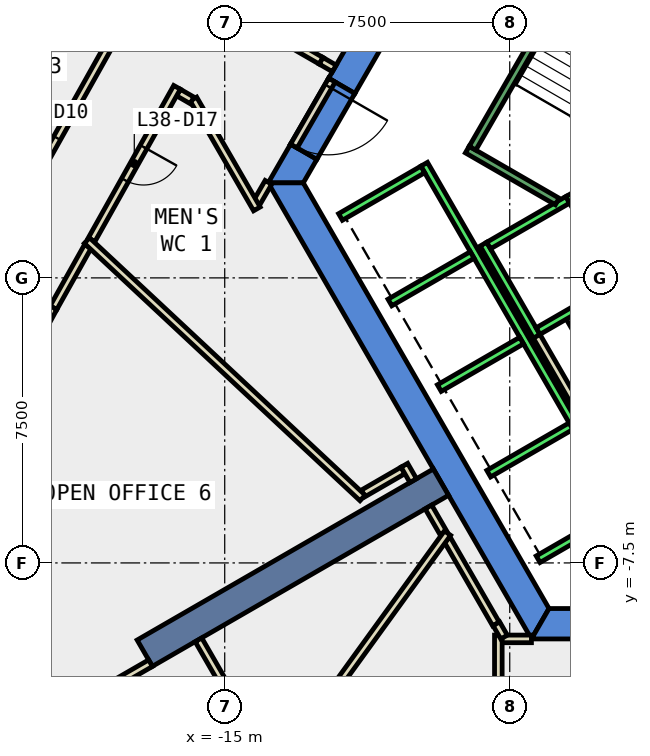
"""IFC4 building model, lengths in metres.
Left out: names, types, materials, properties, quantities, classifications, styles, units other than length and angle.
Written with IfcOpenShell. Run it as: python <this file> out.ifc"""

import sys

from ifc_helpers import new_model, si_unit, direction, frame, frame_2d, origin, place, context, subcontext, project, spatial, polyline, rectangle, outline, extrude, element, fill, save


model = new_model("IFC4")
c1 = context("Model", 3, precision=1e-05, world=origin(), true_north=direction((0.0, 1.0)))
c2 = subcontext(c1, "Body", "Model", "MODEL_VIEW")
j1 = project(units=[si_unit("LENGTHUNIT", "METRE"), si_unit("PLANEANGLEUNIT", "RADIAN")], contexts=[c1])
p1 = place(None, origin())
s1 = spatial("IfcSite", under=j1, at=p1, CompositionType="ELEMENT")
p2 = place(p1, origin())
s2 = spatial("IfcBuilding", under=s1, at=p2, CompositionType="ELEMENT")
p3 = place(p2, frame((0.0, 0.0, 171.8)))
s3 = spatial("IfcBuildingStorey", under=s2, at=p3, CompositionType="ELEMENT", Elevation=171.8)
p4 = place(p3, frame((0.0, 0.0, -0.4)))
e1 = element("IfcWall", 1, at=p4, inside=s3, PredefinedType="SHEAR", context=c2, shape_type="SweptSolid", body=[
    extrude(outline(polyline([(-12.267, 5.252), (-11.575, 4.852), (-6.466, 13.7), (-6.928, 14.5), (-12.267, 5.252)])), origin(), (0.0, 0.0, 1.0), 4.2),
])
p5 = place(p3, frame((0.0, 0.0, -0.4)))
e2 = element("IfcWall", 2, at=p5, inside=s3, PredefinedType="SHEAR", context=c2, shape_type="SweptSolid", body=[
    extrude(outline(polyline([(-12.575, 3.12), (-13.267, 3.52), (-13.856, 2.5), (-12.933, 2.5), (-12.575, 3.12)])), origin(), (0.0, 0.0, 1.0), 4.2),
])
p6 = place(p3, frame((0.0, 0.0, 3.6)))
e3 = element("IfcWall", 3, at=p6, inside=s3, PredefinedType="SHEAR", context=c2, shape_type="SweptSolid", body=[
    extrude(outline(polyline([(-13.267, 3.52), (-12.575, 3.12), (-11.575, 4.852), (-12.267, 5.252), (-13.267, 3.52)])), origin(), (0.0, 0.0, 1.0), 0.2),
])
p7 = place(p3, frame((0.0, 0.0, -0.4)))
e4 = element("IfcWall", 4, at=p7, inside=s3, PredefinedType="SHEAR", context=c2, shape_type="SweptSolid", body=[
    extrude(outline(polyline([(-13.856, 2.5), (-6.928, -9.5), (-6.466, -8.7), (-12.933, 2.5), (-13.856, 2.5)])), origin(), (0.0, 0.0, 1.0), 4.2),
])
p8 = place(p3, frame((0.0, 0.0, -0.4)))
e5 = element("IfcWall", 5, at=p8, inside=s3, PredefinedType="SHEAR", context=c2, shape_type="SweptSolid", body=[
    extrude(outline(polyline([(3.75, -9.5), (3.75, -8.7), (-6.466, -8.7), (-6.928, -9.5), (3.75, -9.5)])), origin(), (0.0, 0.0, 1.0), 4.2),
])
p9 = place(p3, frame((-9.31, -5.375, -0.4), z_axis=(0.0, 0.0, 1.0), x_axis=(-0.866017533419, -0.500013631625, 0.0)))
e6 = element("IfcWall", 6, at=p9, inside=s3, PredefinedType="SHEAR", context=c2, shape_type="SweptSolid", body=[
    extrude(rectangle(XDim=9.0, YDim=0.8, at=frame_2d((4.5, 0.0))), origin(), (0.0, 0.0, 1.0), 4.2),
])
p10 = place(p3, frame((-14.922, 7.131, 0.0), z_axis=(0.0, 0.0, 1.0), x_axis=(0.866124025492, -0.499829143273, 0.0)))
e7 = element("IfcWall", 7, at=p10, inside=s3, PredefinedType="PARTITIONING", context=c2, shape_type="SweptSolid", body=[
    extrude(rectangle(XDim=2.839, YDim=0.2, at=frame_2d((1.42, 0.0))), origin(), (0.0, 0.0, 1.0), 3.8),
])
p11 = place(p3, frame((-13.85, 2.514, 0.0), z_axis=(0.0, 0.0, 1.0), x_axis=(-0.500418219013, -0.865783810244, 0.0)))
e8 = element("IfcWall", 8, at=p11, inside=s3, PredefinedType="PARTITIONING", context=c2, shape_type="SweptSolid", body=[
    extrude(rectangle(XDim=0.607, YDim=0.2, at=frame_2d((0.304, 0.0))), origin(), (0.0, 0.0, 1.0), 3.8),
])
p12 = place(p3, frame((-14.154, 1.815, 0.0), z_axis=(0.0, 0.0, 1.0), x_axis=(-0.500038857296, 0.866002968352, 0.0)))
e9 = element("IfcWall", 9, at=p12, inside=s3, PredefinedType="PARTITIONING", context=c2, shape_type="SweptSolid", body=[
    extrude(rectangle(XDim=3.34, YDim=0.2, at=frame_2d((1.67, 0.0))), origin(), (0.0, 0.0, 1.0), 3.8),
])
p13 = place(p3, frame((-15.86, 4.671, 0.0), z_axis=(0.0, 0.0, 1.0), x_axis=(-0.866047486323, 0.49996174997, 0.0)))
e10 = element("IfcWall", 10, at=p13, inside=s3, PredefinedType="PARTITIONING", context=c2, shape_type="SweptSolid", body=[
    extrude(rectangle(XDim=0.412, YDim=0.2, at=frame_2d((0.206, 0.0))), origin(), (0.0, 0.0, 1.0), 3.8),
])
p14 = place(p3, frame((-16.255, 5.014, 0.0), z_axis=(0.0, 0.0, 1.0), x_axis=(-0.488988017817, -0.87229050117, 0.0)))
e11 = element("IfcWall", 11, at=p14, inside=s3, PredefinedType="PARTITIONING", context=c2, shape_type="SweptSolid", body=[
    extrude(rectangle(XDim=4.599, YDim=0.2, at=frame_2d((2.3, 0.0))), origin(), (0.0, 0.0, 1.0), 3.8),
])
p15 = place(p14, frame((1.8, 0.0, 0.0)))
e12 = element("IfcOpeningElement", 12, at=p15, cuts=e11, PredefinedType="OPENING", context=c2, shape_type="SweptSolid", body=[
    extrude(rectangle(XDim=1.0, YDim=2.1, at=frame_2d((0.5, 1.05))), frame((0.0, 0.11, 0.0), z_axis=(0.0, -1.0, 0.0), x_axis=(1.0, 0.0, 0.0)), (0.0, 0.0, 1.0), 0.22),
])
p16 = place(p3, frame((-18.602, 0.828, 0.0), z_axis=(0.0, 0.0, 1.0), x_axis=(-0.488969229043, -0.872301033502, 0.0)))
e13 = element("IfcWall", 13, at=p16, inside=s3, PredefinedType="PARTITIONING", context=c2, shape_type="SweptSolid", body=[
    extrude(rectangle(XDim=1.849, YDim=0.2, at=frame_2d((0.924, 0.0))), origin(), (0.0, 0.0, 1.0), 3.8),
])
p17 = place(p3, frame((-19.506, -0.785, 0.0), z_axis=(0.0, 0.0, 1.0), x_axis=(-0.477513909405, -0.878624189472, 0.0)))
e14 = element("IfcWall", 14, at=p17, inside=s3, PredefinedType="PARTITIONING", context=c2, shape_type="SweptSolid", body=[
    extrude(rectangle(XDim=6.956, YDim=0.2, at=frame_2d((3.478, 0.0))), origin(), (0.0, 0.0, 1.0), 3.8),
])
p18 = place(p17, frame((2.978, 0.0, 0.0)))
e15 = element("IfcOpeningElement", 15, at=p18, cuts=e14, PredefinedType="OPENING", context=c2, shape_type="SweptSolid", body=[
    extrude(rectangle(XDim=1.0, YDim=2.1, at=frame_2d((0.5, 1.05))), frame((0.0, 0.11, 0.0), z_axis=(0.0, -1.0, 0.0), x_axis=(1.0, 0.0, 0.0)), (0.0, 0.0, 1.0), 0.22),
])
p19 = place(p3, frame((-21.381, 0.165, 0.0), z_axis=(0.0, 0.0, 1.0), x_axis=(0.489014139272, 0.872275857509, 0.0)))
e16 = element("IfcWall", 16, at=p19, inside=s3, PredefinedType="PARTITIONING", context=c2, shape_type="SweptSolid", body=[
    extrude(rectangle(XDim=7.057, YDim=0.2, at=frame_2d((3.529, 0.0))), origin(), (0.0, 0.0, 1.0), 3.8),
])
p20 = place(p19, frame((3.029, 0.0, 0.0)))
e17 = element("IfcOpeningElement", 17, at=p20, cuts=e16, PredefinedType="OPENING", context=c2, shape_type="SweptSolid", body=[
    extrude(rectangle(XDim=1.0, YDim=2.1, at=frame_2d((0.5, 1.05))), frame((0.0, 0.11, 0.0), z_axis=(0.0, -1.0, 0.0), x_axis=(1.0, 0.0, 0.0)), (0.0, 0.0, 1.0), 0.22),
])
p21 = place(p3, frame((-5.126, -2.422, 0.0), z_axis=(0.0, 0.0, 1.0), x_axis=(-0.500062241894, 0.865989465428, 0.0)))
e18 = element("IfcWall", 18, at=p21, inside=s3, PredefinedType="PARTITIONING", context=c2, shape_type="SweptSolid", body=[
    extrude(rectangle(XDim=1.7, YDim=0.2, at=frame_2d((0.85, 0.0))), origin(), (0.0, 0.0, 1.0), 3.8),
])
p22 = place(p3, frame((-5.492, -3.788, 0.0), z_axis=(0.0, 0.0, 1.0), x_axis=(-0.500008949224, 0.866020236886, 0.0)))
e19 = element("IfcWall", 19, at=p22, inside=s3, PredefinedType="PARTITIONING", context=c2, shape_type="SweptSolid", body=[
    extrude(rectangle(XDim=2.68, YDim=0.2, at=frame_2d((1.34, 0.0))), origin(), (0.0, 0.0, 1.0), 3.8),
])
p23 = place(p3, frame((-7.722, -9.499, 0.0), z_axis=(0.0, 0.0, 1.0), x_axis=(1.0, 0.0, 0.0)))
e20 = element("IfcWall", 20, at=p23, inside=s3, PredefinedType="PARTITIONING", context=c2, shape_type="SweptSolid", body=[
    extrude(rectangle(XDim=0.793, YDim=0.2, at=frame_2d((0.396, 0.0))), origin(), (0.0, 0.0, 1.0), 3.8),
])
p24 = place(p3, frame((-7.8, -17.171, 0.0), z_axis=(0.0, 0.0, 1.0), x_axis=(0.0, 1.0, 0.0)))
e21 = element("IfcWall", 21, at=p24, inside=s3, PredefinedType="PARTITIONING", context=c2, shape_type="SweptSolid", body=[
    extrude(rectangle(XDim=7.772, YDim=0.2, at=frame_2d((3.886, 0.0))), origin(), (0.0, 0.0, 1.0), 3.8),
])
p25 = place(p24, frame((3.386, 0.0, 0.0)))
e22 = element("IfcOpeningElement", 22, at=p25, cuts=e21, PredefinedType="OPENING", context=c2, shape_type="SweptSolid", body=[
    extrude(rectangle(XDim=1.0, YDim=2.1, at=frame_2d((0.5, 1.05))), frame((0.0, 0.11, 0.0), z_axis=(0.0, -1.0, 0.0), x_axis=(1.0, 0.0, 0.0)), (0.0, 0.0, 1.0), 0.22),
])
p26 = place(p3, frame((-7.862, -9.107, 0.0), z_axis=(0.0, 0.0, 1.0), x_axis=(-0.499994038704, 0.866028845513, 0.0)))
e23 = element("IfcWall", 23, at=p26, inside=s3, PredefinedType="PARTITIONING", context=c2, shape_type="SweptSolid", body=[
    extrude(rectangle(XDim=2.568, YDim=0.2, at=frame_2d((1.284, 0.0))), origin(), (0.0, 0.0, 1.0), 3.8),
])
p27 = place(p3, frame((-7.65, -9.451, 0.0), z_axis=(0.0, 0.0, 1.0), x_axis=(-0.500297731093, 0.865853440406, 0.0)))
e24 = element("IfcWall", 24, at=p27, inside=s3, PredefinedType="PARTITIONING", context=c2, shape_type="SweptSolid", body=[
    extrude(rectangle(XDim=0.404, YDim=0.2, at=frame_2d((0.202, 0.0))), origin(), (0.0, 0.0, 1.0), 3.8),
])
p28 = place(p3, frame((-9.246, -6.71, 0.0), z_axis=(0.0, 0.0, 1.0), x_axis=(-0.499570510076, 0.86627322795, 0.0)))
e25 = element("IfcWall", 25, at=p28, inside=s3, PredefinedType="PARTITIONING", context=c2, shape_type="SweptSolid", body=[
    extrude(rectangle(XDim=0.788, YDim=0.2, at=frame_2d((0.394, 0.0))), origin(), (0.0, 0.0, 1.0), 3.8),
])
p29 = place(p3, frame((-10.31, -5.066, 0.0), z_axis=(0.0, 0.0, 1.0), x_axis=(-0.865587329375, -0.500758000661, 0.0)))
e26 = element("IfcWall", 26, at=p29, inside=s3, PredefinedType="PARTITIONING", context=c2, shape_type="SweptSolid", body=[
    extrude(rectangle(XDim=1.21, YDim=0.2, at=frame_2d((0.605, 0.0))), origin(), (0.0, 0.0, 1.0), 3.8),
])
p30 = place(p3, frame((-11.372, -5.79, 0.0), z_axis=(0.0, 0.0, 1.0), x_axis=(-0.730922728623, 0.682460229451, 0.0)))
e27 = element("IfcWall", 27, at=p30, inside=s3, PredefinedType="PARTITIONING", context=c2, shape_type="SweptSolid", body=[
    extrude(rectangle(XDim=9.924, YDim=0.2, at=frame_2d((4.962, 0.0))), origin(), (0.0, 0.0, 1.0), 3.8),
])
p31 = place(p3, frame((-13.744, -13.076, 0.0), z_axis=(0.0, 0.0, 1.0), x_axis=(0.586577314901, 0.809893235953, 0.0)))
e28 = element("IfcWall", 28, at=p31, inside=s3, PredefinedType="PARTITIONING", context=c2, shape_type="SweptSolid", body=[
    extrude(rectangle(XDim=7.854, YDim=0.2, at=frame_2d((3.927, 0.0))), origin(), (0.0, 0.0, 1.0), 3.8),
])
p32 = place(p3, frame((-13.736, -12.909, 0.0), z_axis=(0.0, 0.0, 1.0), x_axis=(-0.49990810406, 0.866078453429, 0.0)))
e29 = element("IfcWall", 29, at=p32, inside=s3, PredefinedType="PARTITIONING", context=c2, shape_type="SweptSolid", body=[
    extrude(rectangle(XDim=3.908, YDim=0.2, at=frame_2d((1.954, 0.0))), origin(), (0.0, 0.0, 1.0), 3.8),
])
p33 = place(p3, frame((-16.952, -10.138, 0.0), z_axis=(0.0, 0.0, 1.0), x_axis=(-0.866054992606, -0.499948747156, 0.0)))
e30 = element("IfcWall", 30, at=p33, inside=s3, PredefinedType="PARTITIONING", context=c2, shape_type="SweptSolid", body=[
    extrude(rectangle(XDim=4.701, YDim=0.2, at=frame_2d((2.35, 0.0))), origin(), (0.0, 0.0, 1.0), 3.8),
])
p34 = place(p3, frame((-12.18, 5.202, 0.0), z_axis=(0.0, 0.0, 1.0), x_axis=(-0.50002537861, -0.866010750942, 0.0)))
e31 = element("IfcWall", 31, at=p34, inside=s3, PredefinedType="PARTITIONING", context=c2, shape_type="SweptSolid", body=[
    extrude(rectangle(XDim=2.0, YDim=0.2, at=frame_2d((1.0, 0.0))), origin(), (0.0, 0.0, 1.0), 2.4),
])
p35 = place(p34, frame((0.19, 0.0, 0.0)))
e32 = element("IfcOpeningElement", 32, at=p35, cuts=e31, PredefinedType="OPENING", context=c2, shape_type="SweptSolid", body=[
    extrude(rectangle(XDim=1.8, YDim=2.1, at=frame_2d((0.9, 1.05))), frame((0.0, 0.11, 0.0), z_axis=(0.0, -1.0, 0.0), x_axis=(1.0, 0.0, 0.0)), (0.0, 0.0, 1.0), 0.22),
])
p36 = place(p3, frame((-10.04, -5.334, 0.0), z_axis=(0.0, 0.0, 1.0), x_axis=(-0.499405191234, 0.86636854454, 0.0)))
e33 = element("IfcWall", 33, at=p36, inside=s3, PredefinedType="PARTITIONING", context=c2, shape_type="SweptSolid", body=[
    extrude(rectangle(XDim=0.466, YDim=0.2, at=frame_2d((0.233, 0.0))), origin(), (0.0, 0.0, 1.0), 3.8),
])
p37 = place(p3, frame((-12.463, 5.712, 0.0), z_axis=(0.0, 0.0, 1.0), x_axis=(0.865788603161, -0.500409926597, 0.0)))
e34 = element("IfcWall", 34, at=p37, inside=s3, PredefinedType="PARTITIONING", context=c2, shape_type="SweptSolid", body=[
    extrude(rectangle(XDim=0.4, YDim=0.2, at=frame_2d((0.2, 0.0))), origin(), (0.0, 0.0, 1.0), 2.4),
])
p38 = place(p3, frame((-5.94, 2.188, 0.0), z_axis=(0.0, 0.0, 1.0), x_axis=(0.49994636267, -0.866056369097, 0.0)))
e35 = element("IfcWall", 35, at=p38, inside=s3, PredefinedType="STANDARD", context=c2, shape_type="SweptSolid", body=[
    extrude(rectangle(XDim=2.8, YDim=0.2, at=frame_2d((1.4, 0.0))), origin(), (0.0, 0.0, 1.0), 3.8),
])
p39 = place(p38, frame((1.225, 0.0, 0.0)))
e36 = element("IfcOpeningElement", 36, at=p39, cuts=e35, PredefinedType="OPENING", context=c2, shape_type="SweptSolid", body=[
    extrude(rectangle(XDim=1.1, YDim=2.1, at=frame_2d((0.55, 1.05))), frame((0.0, 0.11, 0.0), z_axis=(0.0, -1.0, 0.0), x_axis=(1.0, 0.0, 0.0)), (0.0, 0.0, 1.0), 0.22),
])
p40 = place(p3, frame((-8.192, 0.888, 0.0), z_axis=(0.0, 0.0, 1.0), x_axis=(0.49994636267, -0.866056369097, 0.0)))
e37 = element("IfcWall", 37, at=p40, inside=s3, PredefinedType="STANDARD", context=c2, shape_type="SweptSolid", body=[
    extrude(rectangle(XDim=2.8, YDim=0.2, at=frame_2d((1.4, 0.0))), origin(), (0.0, 0.0, 1.0), 3.8),
])
for number, where, z_axis, x_axis in (
    (38, (-5.977, 2.052, 0.0), (0.0, 0.0, 1.0), (-0.866, -0.5, 0.0)),
    (39, (-4.677, -0.2, 0.0), (0.0, 0.0, 1.0), (-0.866, -0.5, 0.0)),
):
    element("IfcWall", number, at=place(p3, frame(where, z_axis=z_axis, x_axis=x_axis)), inside=s3, PredefinedType="STANDARD", context=c2, shape_type="SweptSolid", body=[
        extrude(rectangle(XDim=2.399, YDim=0.2, at=frame_2d((1.2, 0.0))), origin(), (0.0, 0.0, 1.0), 3.8),
    ])
p41 = place(p3, frame((-9.751, 2.99, 0.0), z_axis=(0.0, 0.0, 1.0), x_axis=(0.50000090737, -0.866024879913, 0.0)))
e40 = element("IfcWall", 40, at=p41, inside=s3, PredefinedType="STANDARD", context=c2, shape_type="SweptSolid", body=[
    extrude(rectangle(XDim=10.6, YDim=0.2, at=frame_2d((5.3, 0.0))), origin(), (0.0, 0.0, 1.0), 3.8),
])
p42 = place(p3, frame((-9.788, 2.853, 0.0), z_axis=(0.0, 0.0, 1.0), x_axis=(-0.865998541277, -0.500046524342, 0.0)))
e41 = element("IfcWall", 41, at=p42, inside=s3, PredefinedType="STANDARD", context=c2, shape_type="SweptSolid", body=[
    extrude(rectangle(XDim=2.5, YDim=0.2, at=frame_2d((1.25, 0.0))), origin(), (0.0, 0.0, 1.0), 3.8),
])
for number, where, z_axis, x_axis in (
    (42, (-8.488, 0.602, 0.0), (0.0, 0.0, 1.0), (-0.866, -0.5, 0.0)),
    (43, (-7.188, -1.65, 0.0), (0.0, 0.0, 1.0), (-0.866, -0.5, 0.0)),
    (44, (-5.888, -3.902, 0.0), (0.0, 0.0, 1.0), (-0.866, -0.5, 0.0)),
    (45, (-4.588, -6.153, 0.0), (0.0, 0.0, 1.0), (-0.866, -0.5, 0.0)),
):
    element("IfcWall", number, at=place(p3, frame(where, z_axis=z_axis, x_axis=x_axis)), inside=s3, PredefinedType="STANDARD", context=c2, shape_type="SweptSolid", body=[
        extrude(rectangle(XDim=2.5, YDim=0.2, at=frame_2d((1.25, 0.0))), origin(), (0.0, 0.0, 1.0), 3.8),
    ])
p43 = place(p3, frame((-6.25, 2.01, 0.0), z_axis=(0.0, 0.0, 1.0), x_axis=(-0.86611865017, 0.499838457731, 0.0)))
e46 = element("IfcWall", 46, at=p43, inside=s3, PredefinedType="STANDARD", context=c2, shape_type="SweptSolid", body=[
    extrude(rectangle(XDim=2.733, YDim=0.2, at=frame_2d((1.366, 0.0))), origin(), (0.0, 0.0, 1.0), 3.8),
])
p44 = place(p3, frame((-5.03, 9.388, 0.0), z_axis=(0.0, 0.0, 1.0), x_axis=(-0.499978703459, -0.866037698999, 0.0)))
e47 = element("IfcWall", 47, at=p44, inside=s3, PredefinedType="STANDARD", context=c2, shape_type="SweptSolid", body=[
    extrude(rectangle(XDim=6.9, YDim=0.2, at=frame_2d((3.45, 0.0))), origin(), (0.0, 0.0, 1.0), 3.8),
])
p45 = place(p20, origin())
e48 = element("IfcDoor", 48, at=p45, inside=s3, OperationType="SINGLE_SWING_RIGHT", PredefinedType="DOOR", context=c2, shape_type="SweptSolid", body=[
    extrude(rectangle(XDim=1.0, YDim=2.1, at=frame_2d((0.5, 1.05))), frame((0.0, 0.025, 0.0), z_axis=(0.0, -1.0, 0.0), x_axis=(1.0, 0.0, 0.0)), (0.0, 0.0, 1.0), 0.05),
])
fill(e17, e48)
p46 = place(p15, origin())
e49 = element("IfcDoor", 49, at=p46, inside=s3, OperationType="SINGLE_SWING_LEFT", PredefinedType="DOOR", context=c2, shape_type="SweptSolid", body=[
    extrude(rectangle(XDim=1.0, YDim=2.1, at=frame_2d((0.5, 1.05))), frame((0.0, 0.025, 0.0), z_axis=(0.0, -1.0, 0.0), x_axis=(1.0, 0.0, 0.0)), (0.0, 0.0, 1.0), 0.05),
])
fill(e12, e49)
p47 = place(p35, origin())
e50 = element("IfcDoor", 50, at=p47, inside=s3, OperationType="DOUBLE_DOOR_SINGLE_SWING", PredefinedType="DOOR", context=c2, shape_type="SweptSolid", body=[
    extrude(rectangle(XDim=1.8, YDim=2.1, at=frame_2d((0.9, 1.05))), frame((0.0, 0.025, 0.0), z_axis=(0.0, -1.0, 0.0), x_axis=(1.0, 0.0, 0.0)), (0.0, 0.0, 1.0), 0.05),
])
fill(e32, e50)
save(model, sys.argv[1])
